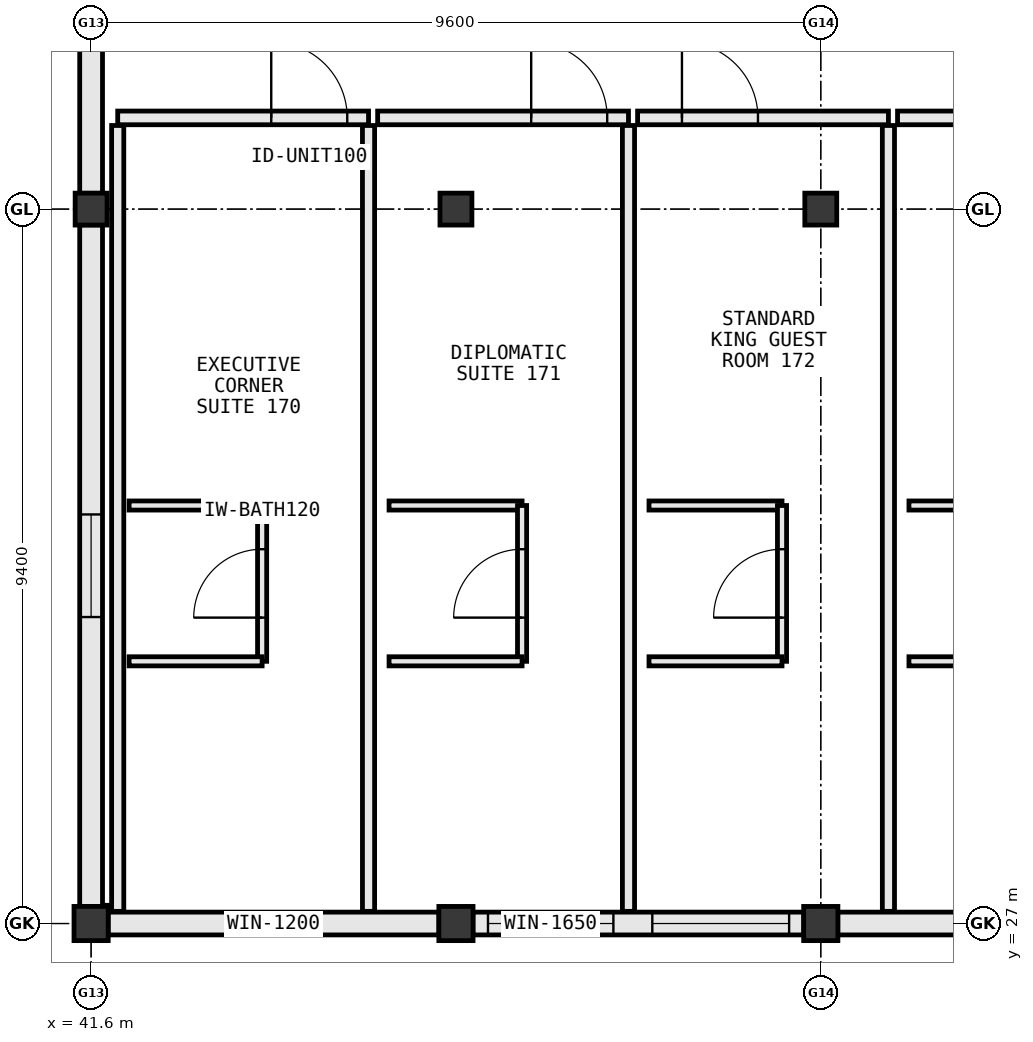
"""IFC4 building model, lengths in metres.
Left out: names, types, materials, properties, quantities, classifications, styles, units other than length and angle.
Written with IfcOpenShell. Run it as: python <this file> out.ifc"""

import sys

from ifc_helpers import new_model, si_unit, direction, frame, frame_2d, origin, origin_2d, place, context, subcontext, project, spatial, rectangle, extrude, element, fill, save


model = new_model("IFC4")
c1 = context("Model", 3, precision=1e-05, world=origin(), true_north=direction((0.0, 1.0)))
c2 = subcontext(c1, "Body", "Model", "MODEL_VIEW")
j1 = project(units=[si_unit("LENGTHUNIT", "METRE"), si_unit("PLANEANGLEUNIT", "RADIAN")], contexts=[c1])
p1 = place(None, origin())
s1 = spatial("IfcSite", under=j1, at=p1, CompositionType="ELEMENT")
p2 = place(p1, origin())
s2 = spatial("IfcBuilding", under=s1, at=p2, CompositionType="ELEMENT")
p3 = place(p2, frame((0.0, 0.0, 23.8)))
s3 = spatial("IfcBuildingStorey", under=s2, at=p3, CompositionType="ELEMENT", Elevation=23.8)
p4 = place(p3, frame((41.6, 27.0, 0.0), z_axis=(0.0, 0.0, 1.0), x_axis=(1.0, 0.0, 0.0)))
e1 = element("IfcColumn", 1, at=p4, inside=s3, PredefinedType="COLUMN", context=c2, shape_type="SweptSolid", body=[
    extrude(rectangle(XDim=0.45, YDim=0.45, at=origin_2d()), origin(), (0.0, 0.0, 1.0), 3.8),
])
p5 = place(p3, frame((41.6, 36.4, 0.0), z_axis=(0.0, 0.0, 1.0), x_axis=(1.0, 0.0, 0.0)))
e2 = element("IfcColumn", 2, at=p5, inside=s3, PredefinedType="COLUMN", context=c2, shape_type="SweptSolid", body=[
    extrude(rectangle(XDim=0.42, YDim=0.42, at=origin_2d()), origin(), (0.0, 0.0, 1.0), 3.8),
])
p6 = place(p3, frame((46.4, 27.0, 0.0), z_axis=(0.0, 0.0, 1.0), x_axis=(1.0, 0.0, 0.0)))
e3 = element("IfcColumn", 3, at=p6, inside=s3, PredefinedType="COLUMN", context=c2, shape_type="SweptSolid", body=[
    extrude(rectangle(XDim=0.45, YDim=0.45, at=origin_2d()), origin(), (0.0, 0.0, 1.0), 3.8),
])
p7 = place(p3, frame((46.4, 36.4, 0.0), z_axis=(0.0, 0.0, 1.0), x_axis=(1.0, 0.0, 0.0)))
e4 = element("IfcColumn", 4, at=p7, inside=s3, PredefinedType="COLUMN", context=c2, shape_type="SweptSolid", body=[
    extrude(rectangle(XDim=0.42, YDim=0.42, at=origin_2d()), origin(), (0.0, 0.0, 1.0), 3.8),
])
p8 = place(p3, frame((51.2, 27.0, 0.0), z_axis=(0.0, 0.0, 1.0), x_axis=(1.0, 0.0, 0.0)))
e5 = element("IfcColumn", 5, at=p8, inside=s3, PredefinedType="COLUMN", context=c2, shape_type="SweptSolid", body=[
    extrude(rectangle(XDim=0.45, YDim=0.45, at=origin_2d()), origin(), (0.0, 0.0, 1.0), 3.8),
])
p9 = place(p3, frame((51.2, 36.4, 0.0), z_axis=(0.0, 0.0, 1.0), x_axis=(1.0, 0.0, 0.0)))
e6 = element("IfcColumn", 6, at=p9, inside=s3, PredefinedType="COLUMN", context=c2, shape_type="SweptSolid", body=[
    extrude(rectangle(XDim=0.42, YDim=0.42, at=origin_2d()), origin(), (0.0, 0.0, 1.0), 3.8),
])
p10 = place(p3, frame((41.6, 46.992, 0.0), z_axis=(0.0, 0.0, 1.0), x_axis=(0.0, -1.0, 0.0)))
e7 = element("IfcWall", 7, at=p10, inside=s3, PredefinedType="STANDARD", context=c2, shape_type="SweptSolid", body=[
    extrude(rectangle(XDim=10.384, YDim=0.3, at=frame_2d((5.192, 0.0))), origin(), (0.0, 0.0, 1.0), 2.905),
])
p11 = place(p10, frame((1.921, 0.0, 0.85)))
e8 = element("IfcOpeningElement", 8, at=p11, cuts=e7, PredefinedType="OPENING", context=c2, shape_type="SweptSolid", body=[
    extrude(rectangle(XDim=1.35, YDim=1.65, at=frame_2d((0.675, 0.825))), frame((0.0, 0.162, 0.0), z_axis=(0.0, -1.0, 0.0), x_axis=(1.0, 0.0, 0.0)), (0.0, 0.0, 1.0), 0.324),
])
p12 = place(p10, frame((7.113, 0.0, 0.85)))
e9 = element("IfcOpeningElement", 9, at=p12, cuts=e7, PredefinedType="OPENING", context=c2, shape_type="SweptSolid", body=[
    extrude(rectangle(XDim=1.35, YDim=1.65, at=frame_2d((0.675, 0.825))), frame((0.0, 0.162, 0.0), z_axis=(0.0, -1.0, 0.0), x_axis=(1.0, 0.0, 0.0)), (0.0, 0.0, 1.0), 0.324),
])
p13 = place(p3, frame((41.6, 36.192, 0.0), z_axis=(0.0, 0.0, 1.0), x_axis=(0.0, -1.0, 0.0)))
e10 = element("IfcWall", 10, at=p13, inside=s3, PredefinedType="STANDARD", context=c2, shape_type="SweptSolid", body=[
    extrude(rectangle(XDim=8.969, YDim=0.3, at=frame_2d((4.484, 0.0))), origin(), (0.0, 0.0, 1.0), 2.925),
])
p14 = place(p13, frame((3.81, 0.0, 0.85)))
e11 = element("IfcOpeningElement", 11, at=p14, cuts=e10, PredefinedType="OPENING", context=c2, shape_type="SweptSolid", body=[
    extrude(rectangle(XDim=1.35, YDim=1.65, at=frame_2d((0.675, 0.825))), frame((0.0, 0.162, 0.0), z_axis=(0.0, -1.0, 0.0), x_axis=(1.0, 0.0, 0.0)), (0.0, 0.0, 1.0), 0.324),
])
p15 = place(p3, frame((41.823, 27.0, 0.0), z_axis=(0.0, 0.0, 1.0), x_axis=(1.0, 0.0, 0.0)))
e12 = element("IfcWall", 12, at=p15, inside=s3, PredefinedType="STANDARD", context=c2, shape_type="SweptSolid", body=[
    extrude(rectangle(XDim=4.354, YDim=0.3, at=frame_2d((2.177, 0.0))), origin(), (0.0, 0.0, 1.0), 3.005),
])
p16 = place(p15, frame((1.577, 0.0, 0.85)))
e13 = element("IfcOpeningElement", 13, at=p16, cuts=e12, PredefinedType="OPENING", context=c2, shape_type="SweptSolid", body=[
    extrude(rectangle(XDim=1.2, YDim=1.55, at=frame_2d((0.6, 0.775))), frame((0.0, 0.162, 0.0), z_axis=(0.0, -1.0, 0.0), x_axis=(1.0, 0.0, 0.0)), (0.0, 0.0, 1.0), 0.324),
])
p17 = place(p3, frame((46.623, 27.0, 0.0), z_axis=(0.0, 0.0, 1.0), x_axis=(1.0, 0.0, 0.0)))
e14 = element("IfcWall", 14, at=p17, inside=s3, PredefinedType="STANDARD", context=c2, shape_type="SweptSolid", body=[
    extrude(rectangle(XDim=4.354, YDim=0.3, at=frame_2d((2.177, 0.0))), origin(), (0.0, 0.0, 1.0), 3.005),
])
p18 = place(p17, frame((0.198, 0.0, 0.85)))
e15 = element("IfcOpeningElement", 15, at=p18, cuts=e14, PredefinedType="OPENING", context=c2, shape_type="SweptSolid", body=[
    extrude(rectangle(XDim=1.65, YDim=1.8, at=frame_2d((0.825, 0.9))), frame((0.0, 0.162, 0.0), z_axis=(0.0, -1.0, 0.0), x_axis=(1.0, 0.0, 0.0)), (0.0, 0.0, 1.0), 0.324),
])
p19 = place(p17, frame((2.361, 0.0, 0.85)))
e16 = element("IfcOpeningElement", 16, at=p19, cuts=e14, PredefinedType="OPENING", context=c2, shape_type="SweptSolid", body=[
    extrude(rectangle(XDim=1.8, YDim=1.85, at=frame_2d((0.9, 0.925))), frame((0.0, 0.162, 0.0), z_axis=(0.0, -1.0, 0.0), x_axis=(1.0, 0.0, 0.0)), (0.0, 0.0, 1.0), 0.324),
])
p20 = place(p3, frame((51.423, 27.0, 0.0), z_axis=(0.0, 0.0, 1.0), x_axis=(1.0, 0.0, 0.0)))
e17 = element("IfcWall", 17, at=p20, inside=s3, PredefinedType="STANDARD", context=c2, shape_type="SweptSolid", body=[
    extrude(rectangle(XDim=9.119, YDim=0.3, at=frame_2d((4.56, 0.0))), origin(), (0.0, 0.0, 1.0), 2.785),
])
p21 = place(p20, frame((1.68, 0.0, 0.85)))
e18 = element("IfcOpeningElement", 18, at=p21, cuts=e17, PredefinedType="OPENING", context=c2, shape_type="SweptSolid", body=[
    extrude(rectangle(XDim=1.2, YDim=1.55, at=frame_2d((0.6, 0.775))), frame((0.0, 0.162, 0.0), z_axis=(0.0, -1.0, 0.0), x_axis=(1.0, 0.0, 0.0)), (0.0, 0.0, 1.0), 0.324),
])
p22 = place(p20, frame((6.239, 0.0, 0.85)))
e19 = element("IfcOpeningElement", 19, at=p22, cuts=e17, PredefinedType="OPENING", context=c2, shape_type="SweptSolid", body=[
    extrude(rectangle(XDim=1.2, YDim=1.55, at=frame_2d((0.6, 0.775))), frame((0.0, 0.162, 0.0), z_axis=(0.0, -1.0, 0.0), x_axis=(1.0, 0.0, 0.0)), (0.0, 0.0, 1.0), 0.324),
])
p23 = place(p3, frame((45.25, 37.6, 0.0), z_axis=(0.0, 0.0, 1.0), x_axis=(-1.0, 0.0, 0.0)))
e20 = element("IfcWall", 20, at=p23, inside=s3, PredefinedType="PARTITIONING", context=c2, shape_type="SweptSolid", body=[
    extrude(rectangle(XDim=3.3, YDim=0.18, at=frame_2d((1.65, 0.0))), origin(), (0.0, 0.0, 1.0), 3.55),
])
p24 = place(p23, frame((0.28, 0.0, 0.0)))
e21 = element("IfcOpeningElement", 21, at=p24, cuts=e20, PredefinedType="OPENING", context=c2, shape_type="SweptSolid", body=[
    extrude(rectangle(XDim=1.0, YDim=2.2, at=frame_2d((0.5, 1.1))), frame((0.0, 0.102, 0.0), z_axis=(0.0, -1.0, 0.0), x_axis=(1.0, 0.0, 0.0)), (0.0, 0.0, 1.0), 0.204),
])
p25 = place(p3, frame((41.95, 27.16, 0.0), z_axis=(0.0, 0.0, 1.0), x_axis=(0.0, 1.0, 0.0)))
e22 = element("IfcWall", 22, at=p25, inside=s3, PredefinedType="PARTITIONING", context=c2, shape_type="SweptSolid", body=[
    extrude(rectangle(XDim=10.34, YDim=0.16, at=frame_2d((5.17, 0.0))), origin(), (0.0, 0.0, 1.0), 2.905),
])
p26 = place(p3, frame((45.25, 27.16, 0.0), z_axis=(0.0, 0.0, 1.0), x_axis=(0.0, 1.0, 0.0)))
e23 = element("IfcWall", 23, at=p26, inside=s3, PredefinedType="PARTITIONING", context=c2, shape_type="SweptSolid", body=[
    extrude(rectangle(XDim=10.34, YDim=0.16, at=frame_2d((5.17, 0.0))), origin(), (0.0, 0.0, 1.0), 3.55),
])
p27 = place(p3, frame((42.1, 32.5, 0.0), z_axis=(0.0, 0.0, 1.0), x_axis=(1.0, 0.0, 0.0)))
e24 = element("IfcWall", 24, at=p27, inside=s3, PredefinedType="PARTITIONING", context=c2, shape_type="SweptSolid", body=[
    extrude(rectangle(XDim=1.75, YDim=0.12, at=frame_2d((0.875, 0.0))), origin(), (0.0, 0.0, 1.0), 3.55),
])
p28 = place(p3, frame((43.85, 30.45, 0.0), z_axis=(0.0, 0.0, 1.0), x_axis=(0.0, 1.0, 0.0)))
e25 = element("IfcWall", 25, at=p28, inside=s3, PredefinedType="PARTITIONING", context=c2, shape_type="SweptSolid", body=[
    extrude(rectangle(XDim=2.05, YDim=0.12, at=frame_2d((1.025, 0.0))), origin(), (0.0, 0.0, 1.0), 3.095),
])
p29 = place(p28, frame((0.575, 0.0, 0.0)))
e26 = element("IfcOpeningElement", 26, at=p29, cuts=e25, PredefinedType="OPENING", context=c2, shape_type="SweptSolid", body=[
    extrude(rectangle(XDim=0.9, YDim=2.15, at=frame_2d((0.45, 1.075))), frame((0.0, 0.072, 0.0), z_axis=(0.0, -1.0, 0.0), x_axis=(1.0, 0.0, 0.0)), (0.0, 0.0, 1.0), 0.144),
])
p30 = place(p3, frame((42.1, 30.45, 0.0), z_axis=(0.0, 0.0, 1.0), x_axis=(1.0, 0.0, 0.0)))
e27 = element("IfcWall", 27, at=p30, inside=s3, PredefinedType="PARTITIONING", context=c2, shape_type="SweptSolid", body=[
    extrude(rectangle(XDim=1.75, YDim=0.12, at=frame_2d((0.875, 0.0))), origin(), (0.0, 0.0, 1.0), 3.55),
])
p31 = place(p3, frame((48.67, 37.6, 0.0), z_axis=(0.0, 0.0, 1.0), x_axis=(-1.0, 0.0, 0.0)))
e28 = element("IfcWall", 28, at=p31, inside=s3, PredefinedType="PARTITIONING", context=c2, shape_type="SweptSolid", body=[
    extrude(rectangle(XDim=3.3, YDim=0.18, at=frame_2d((1.65, 0.0))), origin(), (0.0, 0.0, 1.0), 3.55),
])
p32 = place(p31, frame((0.28, 0.0, 0.0)))
e29 = element("IfcOpeningElement", 29, at=p32, cuts=e28, PredefinedType="OPENING", context=c2, shape_type="SweptSolid", body=[
    extrude(rectangle(XDim=1.0, YDim=2.2, at=frame_2d((0.5, 1.1))), frame((0.0, 0.102, 0.0), z_axis=(0.0, -1.0, 0.0), x_axis=(1.0, 0.0, 0.0)), (0.0, 0.0, 1.0), 0.204),
])
p33 = place(p3, frame((48.67, 27.16, 0.0), z_axis=(0.0, 0.0, 1.0), x_axis=(0.0, 1.0, 0.0)))
e30 = element("IfcWall", 30, at=p33, inside=s3, PredefinedType="PARTITIONING", context=c2, shape_type="SweptSolid", body=[
    extrude(rectangle(XDim=10.34, YDim=0.16, at=frame_2d((5.17, 0.0))), origin(), (0.0, 0.0, 1.0), 3.05),
])
p34 = place(p3, frame((45.52, 32.5, 0.0), z_axis=(0.0, 0.0, 1.0), x_axis=(1.0, 0.0, 0.0)))
e31 = element("IfcWall", 31, at=p34, inside=s3, PredefinedType="PARTITIONING", context=c2, shape_type="SweptSolid", body=[
    extrude(rectangle(XDim=1.75, YDim=0.12, at=frame_2d((0.875, 0.0))), origin(), (0.0, 0.0, 1.0), 3.55),
])
p35 = place(p3, frame((47.27, 30.45, 0.0), z_axis=(0.0, 0.0, 1.0), x_axis=(0.0, 1.0, 0.0)))
e32 = element("IfcWall", 32, at=p35, inside=s3, PredefinedType="PARTITIONING", context=c2, shape_type="SweptSolid", body=[
    extrude(rectangle(XDim=2.05, YDim=0.12, at=frame_2d((1.025, 0.0))), origin(), (0.0, 0.0, 1.0), 3.55),
])
p36 = place(p35, frame((0.575, 0.0, 0.0)))
e33 = element("IfcOpeningElement", 33, at=p36, cuts=e32, PredefinedType="OPENING", context=c2, shape_type="SweptSolid", body=[
    extrude(rectangle(XDim=0.9, YDim=2.15, at=frame_2d((0.45, 1.075))), frame((0.0, 0.072, 0.0), z_axis=(0.0, -1.0, 0.0), x_axis=(1.0, 0.0, 0.0)), (0.0, 0.0, 1.0), 0.144),
])
p37 = place(p3, frame((45.52, 30.45, 0.0), z_axis=(0.0, 0.0, 1.0), x_axis=(1.0, 0.0, 0.0)))
e34 = element("IfcWall", 34, at=p37, inside=s3, PredefinedType="PARTITIONING", context=c2, shape_type="SweptSolid", body=[
    extrude(rectangle(XDim=1.75, YDim=0.12, at=frame_2d((0.875, 0.0))), origin(), (0.0, 0.0, 1.0), 3.55),
])
p38 = place(p3, frame((52.09, 37.6, 0.0), z_axis=(0.0, 0.0, 1.0), x_axis=(-1.0, 0.0, 0.0)))
e35 = element("IfcWall", 35, at=p38, inside=s3, PredefinedType="PARTITIONING", context=c2, shape_type="SweptSolid", body=[
    extrude(rectangle(XDim=3.3, YDim=0.18, at=frame_2d((1.65, 0.0))), origin(), (0.0, 0.0, 1.0), 3.55),
])
p39 = place(p38, frame((1.717, 0.0, 0.0)))
e36 = element("IfcOpeningElement", 36, at=p39, cuts=e35, PredefinedType="OPENING", context=c2, shape_type="SweptSolid", body=[
    extrude(rectangle(XDim=1.0, YDim=2.2, at=frame_2d((0.5, 1.1))), frame((0.0, 0.102, 0.0), z_axis=(0.0, -1.0, 0.0), x_axis=(1.0, 0.0, 0.0)), (0.0, 0.0, 1.0), 0.204),
])
p40 = place(p3, frame((52.09, 27.16, 0.0), z_axis=(0.0, 0.0, 1.0), x_axis=(0.0, 1.0, 0.0)))
e37 = element("IfcWall", 37, at=p40, inside=s3, PredefinedType="PARTITIONING", context=c2, shape_type="SweptSolid", body=[
    extrude(rectangle(XDim=10.34, YDim=0.16, at=frame_2d((5.17, 0.0))), origin(), (0.0, 0.0, 1.0), 3.55),
])
p41 = place(p3, frame((48.94, 32.5, 0.0), z_axis=(0.0, 0.0, 1.0), x_axis=(1.0, 0.0, 0.0)))
e38 = element("IfcWall", 38, at=p41, inside=s3, PredefinedType="PARTITIONING", context=c2, shape_type="SweptSolid", body=[
    extrude(rectangle(XDim=1.75, YDim=0.12, at=frame_2d((0.875, 0.0))), origin(), (0.0, 0.0, 1.0), 3.55),
])
p42 = place(p3, frame((50.69, 30.45, 0.0), z_axis=(0.0, 0.0, 1.0), x_axis=(0.0, 1.0, 0.0)))
e39 = element("IfcWall", 39, at=p42, inside=s3, PredefinedType="PARTITIONING", context=c2, shape_type="SweptSolid", body=[
    extrude(rectangle(XDim=2.05, YDim=0.12, at=frame_2d((1.025, 0.0))), origin(), (0.0, 0.0, 1.0), 3.55),
])
p43 = place(p42, frame((0.575, 0.0, 0.0)))
e40 = element("IfcOpeningElement", 40, at=p43, cuts=e39, PredefinedType="OPENING", context=c2, shape_type="SweptSolid", body=[
    extrude(rectangle(XDim=0.9, YDim=2.15, at=frame_2d((0.45, 1.075))), frame((0.0, 0.072, 0.0), z_axis=(0.0, -1.0, 0.0), x_axis=(1.0, 0.0, 0.0)), (0.0, 0.0, 1.0), 0.144),
])
p44 = place(p3, frame((48.94, 30.45, 0.0), z_axis=(0.0, 0.0, 1.0), x_axis=(1.0, 0.0, 0.0)))
e41 = element("IfcWall", 41, at=p44, inside=s3, PredefinedType="PARTITIONING", context=c2, shape_type="SweptSolid", body=[
    extrude(rectangle(XDim=1.75, YDim=0.12, at=frame_2d((0.875, 0.0))), origin(), (0.0, 0.0, 1.0), 3.55),
])
p45 = place(p3, frame((55.51, 37.6, 0.0), z_axis=(0.0, 0.0, 1.0), x_axis=(-1.0, 0.0, 0.0)))
e42 = element("IfcWall", 42, at=p45, inside=s3, PredefinedType="PARTITIONING", context=c2, shape_type="SweptSolid", body=[
    extrude(rectangle(XDim=3.3, YDim=0.18, at=frame_2d((1.65, 0.0))), origin(), (0.0, 0.0, 1.0), 3.55),
])
p46 = place(p45, frame((0.28, 0.0, 0.0)))
e43 = element("IfcOpeningElement", 43, at=p46, cuts=e42, PredefinedType="OPENING", context=c2, shape_type="SweptSolid", body=[
    extrude(rectangle(XDim=1.0, YDim=2.2, at=frame_2d((0.5, 1.1))), frame((0.0, 0.102, 0.0), z_axis=(0.0, -1.0, 0.0), x_axis=(1.0, 0.0, 0.0)), (0.0, 0.0, 1.0), 0.204),
])
for number, where, z_axis, x_axis in (
    (44, (52.36, 32.5, 0.0), (0.0, 0.0, 1.0), (1.0, 0.0, 0.0)),
    (45, (52.36, 30.45, 0.0), (0.0, 0.0, 1.0), (1.0, 0.0, 0.0)),
):
    element("IfcWall", number, at=place(p3, frame(where, z_axis=z_axis, x_axis=x_axis)), inside=s3, PredefinedType="PARTITIONING", context=c2, shape_type="SweptSolid", body=[
        extrude(rectangle(XDim=1.75, YDim=0.12, at=frame_2d((0.875, 0.0))), origin(), (0.0, 0.0, 1.0), 3.55),
    ])
p47 = place(p14, origin())
e46 = element("IfcWindow", 46, at=p47, inside=s3, PartitioningType="SINGLE_PANEL", PredefinedType="WINDOW", context=c2, shape_type="SweptSolid", body=[
    extrude(rectangle(XDim=1.35, YDim=1.65, at=frame_2d((0.675, 0.825))), frame((0.0, 0.03, 0.0), z_axis=(0.0, -1.0, 0.0), x_axis=(1.0, 0.0, 0.0)), (0.0, 0.0, 1.0), 0.06),
])
fill(e11, e46)
p48 = place(p16, origin())
e47 = element("IfcWindow", 47, at=p48, inside=s3, PartitioningType="SINGLE_PANEL", PredefinedType="WINDOW", context=c2, shape_type="SweptSolid", body=[
    extrude(rectangle(XDim=1.2, YDim=1.55, at=frame_2d((0.6, 0.775))), frame((0.0, 0.03, 0.0), z_axis=(0.0, -1.0, 0.0), x_axis=(1.0, 0.0, 0.0)), (0.0, 0.0, 1.0), 0.06),
])
fill(e13, e47)
p49 = place(p18, origin())
e48 = element("IfcWindow", 48, at=p49, inside=s3, PartitioningType="SINGLE_PANEL", PredefinedType="WINDOW", context=c2, shape_type="SweptSolid", body=[
    extrude(rectangle(XDim=1.65, YDim=1.8, at=frame_2d((0.825, 0.9))), frame((0.0, 0.03, 0.0), z_axis=(0.0, -1.0, 0.0), x_axis=(1.0, 0.0, 0.0)), (0.0, 0.0, 1.0), 0.06),
])
fill(e15, e48)
p50 = place(p19, origin())
e49 = element("IfcWindow", 49, at=p50, inside=s3, PartitioningType="SINGLE_PANEL", PredefinedType="WINDOW", context=c2, shape_type="SweptSolid", body=[
    extrude(rectangle(XDim=1.8, YDim=1.85, at=frame_2d((0.9, 0.925))), frame((0.0, 0.03, 0.0), z_axis=(0.0, -1.0, 0.0), x_axis=(1.0, 0.0, 0.0)), (0.0, 0.0, 1.0), 0.06),
])
fill(e16, e49)
p51 = place(p24, frame((1.0, 0.0, 0.0), z_axis=(0.0, 0.0, 1.0), x_axis=(-1.0, 0.0, 0.0)))
e50 = element("IfcDoor", 50, at=p51, inside=s3, OperationType="SINGLE_SWING_RIGHT", PredefinedType="DOOR", context=c2, shape_type="SweptSolid", body=[
    extrude(rectangle(XDim=1.0, YDim=2.2, at=frame_2d((0.5, 1.1))), frame((0.0, 0.025, 0.0), z_axis=(0.0, -1.0, 0.0), x_axis=(1.0, 0.0, 0.0)), (0.0, 0.0, 1.0), 0.05),
])
fill(e21, e50)
p52 = place(p29, origin())
e51 = element("IfcDoor", 51, at=p52, inside=s3, OperationType="SINGLE_SWING_LEFT", PredefinedType="DOOR", context=c2, shape_type="SweptSolid", body=[
    extrude(rectangle(XDim=0.9, YDim=2.15, at=frame_2d((0.45, 1.075))), frame((0.0, 0.025, 0.0), z_axis=(0.0, -1.0, 0.0), x_axis=(1.0, 0.0, 0.0)), (0.0, 0.0, 1.0), 0.05),
])
fill(e26, e51)
p53 = place(p32, frame((1.0, 0.0, 0.0), z_axis=(0.0, 0.0, 1.0), x_axis=(-1.0, 0.0, 0.0)))
e52 = element("IfcDoor", 52, at=p53, inside=s3, OperationType="SINGLE_SWING_RIGHT", PredefinedType="DOOR", context=c2, shape_type="SweptSolid", body=[
    extrude(rectangle(XDim=1.0, YDim=2.2, at=frame_2d((0.5, 1.1))), frame((0.0, 0.025, 0.0), z_axis=(0.0, -1.0, 0.0), x_axis=(1.0, 0.0, 0.0)), (0.0, 0.0, 1.0), 0.05),
])
fill(e29, e52)
p54 = place(p36, origin())
e53 = element("IfcDoor", 53, at=p54, inside=s3, OperationType="SINGLE_SWING_LEFT", PredefinedType="DOOR", context=c2, shape_type="SweptSolid", body=[
    extrude(rectangle(XDim=0.9, YDim=2.15, at=frame_2d((0.45, 1.075))), frame((0.0, 0.025, 0.0), z_axis=(0.0, -1.0, 0.0), x_axis=(1.0, 0.0, 0.0)), (0.0, 0.0, 1.0), 0.05),
])
fill(e33, e53)
p55 = place(p39, frame((1.0, 0.0, 0.0), z_axis=(0.0, 0.0, 1.0), x_axis=(-1.0, 0.0, 0.0)))
e54 = element("IfcDoor", 54, at=p55, inside=s3, OperationType="SINGLE_SWING_RIGHT", PredefinedType="DOOR", context=c2, shape_type="SweptSolid", body=[
    extrude(rectangle(XDim=1.0, YDim=2.2, at=frame_2d((0.5, 1.1))), frame((0.0, 0.025, 0.0), z_axis=(0.0, -1.0, 0.0), x_axis=(1.0, 0.0, 0.0)), (0.0, 0.0, 1.0), 0.05),
])
fill(e36, e54)
p56 = place(p43, origin())
e55 = element("IfcDoor", 55, at=p56, inside=s3, OperationType="SINGLE_SWING_LEFT", PredefinedType="DOOR", context=c2, shape_type="SweptSolid", body=[
    extrude(rectangle(XDim=0.9, YDim=2.15, at=frame_2d((0.45, 1.075))), frame((0.0, 0.025, 0.0), z_axis=(0.0, -1.0, 0.0), x_axis=(1.0, 0.0, 0.0)), (0.0, 0.0, 1.0), 0.05),
])
fill(e40, e55)
save(model, sys.argv[1])
